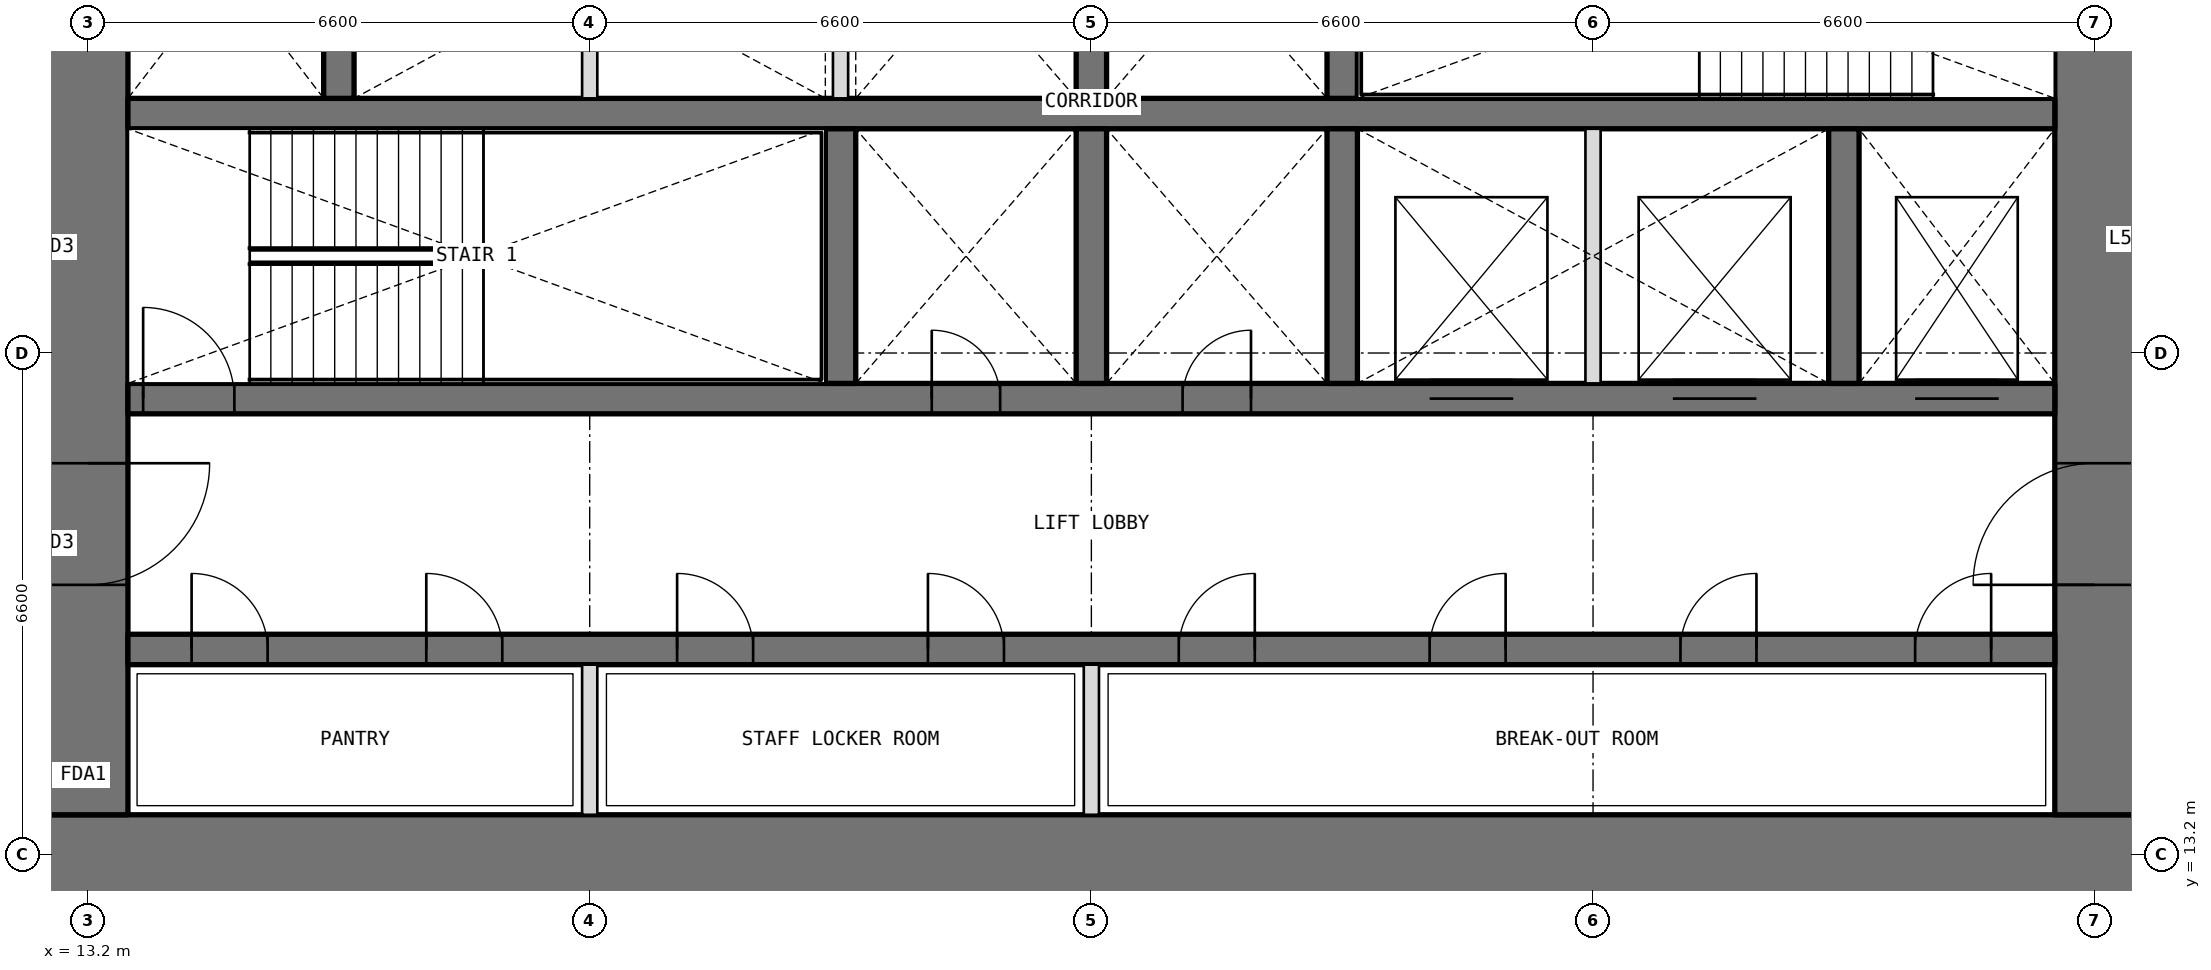
"""IFC4 building model, lengths in metres.
Left out: names, types, materials, properties, quantities, classifications, styles, units other than length and angle.
Written with IfcOpenShell. Run it as: python <this file> out.ifc"""

import sys

from ifc_helpers import new_model, si_unit, direction, frame, frame_2d, origin, place, context, subcontext, project, spatial, rectangle, extrude, element, fill, save


model = new_model("IFC4")
c1 = context("Model", 3, precision=1e-05, world=origin(), true_north=direction((0.0, 1.0)))
c2 = subcontext(c1, "Body", "Model", "MODEL_VIEW")
j1 = project(units=[si_unit("LENGTHUNIT", "METRE"), si_unit("PLANEANGLEUNIT", "RADIAN")], contexts=[c1])
p1 = place(None, origin())
s1 = spatial("IfcSite", under=j1, at=p1, CompositionType="ELEMENT")
p2 = place(p1, origin())
s2 = spatial("IfcBuilding", under=s1, at=p2, CompositionType="ELEMENT")
p3 = place(p2, frame((0.0, 0.0, 258.6)))
s3 = spatial("IfcBuildingStorey", under=s2, at=p3, CompositionType="ELEMENT", Elevation=258.6)
p4 = place(p3, frame((12.675, 13.2, 0.0), z_axis=(0.0, 0.0, 1.0), x_axis=(1.0, 0.0, 0.0)))
e1 = element("IfcWall", 1, at=p4, inside=s3, PredefinedType="SHEAR", context=c2, shape_type="SweptSolid", body=[
    extrude(rectangle(XDim=27.45, YDim=1.05, at=frame_2d((13.725, 0.0))), origin(), (0.0, 0.0, 1.0), 4.2),
])
p5 = place(p3, frame((39.6, 13.725, 0.0), z_axis=(0.0, 0.0, 1.0), x_axis=(0.0, 1.0, 0.0)))
e2 = element("IfcWall", 2, at=p5, inside=s3, PredefinedType="SHEAR", context=c2, shape_type="SweptSolid", body=[
    extrude(rectangle(XDim=18.75, YDim=1.05, at=frame_2d((9.375, 0.0))), origin(), (0.0, 0.0, 1.0), 4.2),
])
p6 = place(p5, frame((3.025, 0.0, 0.0)))
e3 = element("IfcOpeningElement", 3, at=p6, cuts=e2, PredefinedType="OPENING", context=c2, shape_type="SweptSolid", body=[
    extrude(rectangle(XDim=1.6, YDim=2.1, at=frame_2d((0.8, 1.05))), frame((0.0, 0.535, 0.0), z_axis=(0.0, -1.0, 0.0), x_axis=(1.0, 0.0, 0.0)), (0.0, 0.0, 1.0), 1.07),
])
p7 = place(p5, frame((13.825, 0.0, 0.0)))
e4 = element("IfcOpeningElement", 4, at=p7, cuts=e2, PredefinedType="OPENING", context=c2, shape_type="SweptSolid", body=[
    extrude(rectangle(XDim=1.6, YDim=2.1, at=frame_2d((0.8, 1.05))), frame((0.0, 0.535, 0.0), z_axis=(0.0, -1.0, 0.0), x_axis=(1.0, 0.0, 0.0)), (0.0, 0.0, 1.0), 1.07),
])
p8 = place(p3, frame((13.2, 32.475, 0.0), z_axis=(0.0, 0.0, 1.0), x_axis=(0.0, -1.0, 0.0)))
e5 = element("IfcWall", 5, at=p8, inside=s3, PredefinedType="SHEAR", context=c2, shape_type="SweptSolid", body=[
    extrude(rectangle(XDim=18.75, YDim=1.05, at=frame_2d((9.375, 0.0))), origin(), (0.0, 0.0, 1.0), 4.2),
])
p9 = place(p8, frame((14.125, 0.0, 0.0)))
e6 = element("IfcOpeningElement", 6, at=p9, cuts=e5, PredefinedType="OPENING", context=c2, shape_type="SweptSolid", body=[
    extrude(rectangle(XDim=1.6, YDim=2.1, at=frame_2d((0.8, 1.05))), frame((0.0, 0.535, 0.0), z_axis=(0.0, -1.0, 0.0), x_axis=(1.0, 0.0, 0.0)), (0.0, 0.0, 1.0), 1.07),
])
p10 = place(p8, frame((3.325, 0.0, 0.0)))
e7 = element("IfcOpeningElement", 7, at=p10, cuts=e5, PredefinedType="OPENING", context=c2, shape_type="SweptSolid", body=[
    extrude(rectangle(XDim=1.6, YDim=2.1, at=frame_2d((0.8, 1.05))), frame((0.0, 0.535, 0.0), z_axis=(0.0, -1.0, 0.0), x_axis=(1.0, 0.0, 0.0)), (0.0, 0.0, 1.0), 1.07),
])
p11 = place(p3, frame((13.725, 15.9, 0.0), z_axis=(0.0, 0.0, 1.0), x_axis=(1.0, 0.0, 0.0)))
e8 = element("IfcWall", 8, at=p11, inside=s3, PredefinedType="SHEAR", context=c2, shape_type="SweptSolid", body=[
    extrude(rectangle(XDim=25.35, YDim=0.4, at=frame_2d((12.675, 0.0))), origin(), (0.0, 0.0, 1.0), 4.2),
])
p12 = place(p11, frame((0.837, 0.0, 0.0)))
e9 = element("IfcOpeningElement", 9, at=p12, cuts=e8, PredefinedType="OPENING", context=c2, shape_type="SweptSolid", body=[
    extrude(rectangle(XDim=1.0, YDim=2.1, at=frame_2d((0.5, 1.05))), frame((0.0, 0.21, 0.0), z_axis=(0.0, -1.0, 0.0), x_axis=(1.0, 0.0, 0.0)), (0.0, 0.0, 1.0), 0.42),
])
p13 = place(p11, frame((3.925, 0.0, 0.0)))
e10 = element("IfcOpeningElement", 10, at=p13, cuts=e8, PredefinedType="OPENING", context=c2, shape_type="SweptSolid", body=[
    extrude(rectangle(XDim=1.0, YDim=2.1, at=frame_2d((0.5, 1.05))), frame((0.0, 0.21, 0.0), z_axis=(0.0, -1.0, 0.0), x_axis=(1.0, 0.0, 0.0)), (0.0, 0.0, 1.0), 0.42),
])
p14 = place(p11, frame((7.225, 0.0, 0.0)))
e11 = element("IfcOpeningElement", 11, at=p14, cuts=e8, PredefinedType="OPENING", context=c2, shape_type="SweptSolid", body=[
    extrude(rectangle(XDim=1.0, YDim=2.1, at=frame_2d((0.5, 1.05))), frame((0.0, 0.21, 0.0), z_axis=(0.0, -1.0, 0.0), x_axis=(1.0, 0.0, 0.0)), (0.0, 0.0, 1.0), 0.42),
])
p15 = place(p11, frame((10.525, 0.0, 0.0)))
e12 = element("IfcOpeningElement", 12, at=p15, cuts=e8, PredefinedType="OPENING", context=c2, shape_type="SweptSolid", body=[
    extrude(rectangle(XDim=1.0, YDim=2.1, at=frame_2d((0.5, 1.05))), frame((0.0, 0.21, 0.0), z_axis=(0.0, -1.0, 0.0), x_axis=(1.0, 0.0, 0.0)), (0.0, 0.0, 1.0), 0.42),
])
p16 = place(p11, frame((13.825, 0.0, 0.0)))
e13 = element("IfcOpeningElement", 13, at=p16, cuts=e8, PredefinedType="OPENING", context=c2, shape_type="SweptSolid", body=[
    extrude(rectangle(XDim=1.0, YDim=2.1, at=frame_2d((0.5, 1.05))), frame((0.0, 0.21, 0.0), z_axis=(0.0, -1.0, 0.0), x_axis=(1.0, 0.0, 0.0)), (0.0, 0.0, 1.0), 0.42),
])
p17 = place(p11, frame((17.125, 0.0, 0.0)))
e14 = element("IfcOpeningElement", 14, at=p17, cuts=e8, PredefinedType="OPENING", context=c2, shape_type="SweptSolid", body=[
    extrude(rectangle(XDim=1.0, YDim=2.1, at=frame_2d((0.5, 1.05))), frame((0.0, 0.21, 0.0), z_axis=(0.0, -1.0, 0.0), x_axis=(1.0, 0.0, 0.0)), (0.0, 0.0, 1.0), 0.42),
])
p18 = place(p11, frame((20.425, 0.0, 0.0)))
e15 = element("IfcOpeningElement", 15, at=p18, cuts=e8, PredefinedType="OPENING", context=c2, shape_type="SweptSolid", body=[
    extrude(rectangle(XDim=1.0, YDim=2.1, at=frame_2d((0.5, 1.05))), frame((0.0, 0.21, 0.0), z_axis=(0.0, -1.0, 0.0), x_axis=(1.0, 0.0, 0.0)), (0.0, 0.0, 1.0), 0.42),
])
p19 = place(p11, frame((23.512, 0.0, 0.0)))
e16 = element("IfcOpeningElement", 16, at=p19, cuts=e8, PredefinedType="OPENING", context=c2, shape_type="SweptSolid", body=[
    extrude(rectangle(XDim=1.0, YDim=2.1, at=frame_2d((0.5, 1.05))), frame((0.0, 0.21, 0.0), z_axis=(0.0, -1.0, 0.0), x_axis=(1.0, 0.0, 0.0)), (0.0, 0.0, 1.0), 0.42),
])
p20 = place(p3, frame((13.725, 19.2, 0.0), z_axis=(0.0, 0.0, 1.0), x_axis=(1.0, 0.0, 0.0)))
e17 = element("IfcWall", 17, at=p20, inside=s3, PredefinedType="SHEAR", context=c2, shape_type="SweptSolid", body=[
    extrude(rectangle(XDim=25.35, YDim=0.4, at=frame_2d((12.675, 0.0))), origin(), (0.0, 0.0, 1.0), 4.2),
])
p21 = place(p20, frame((10.575, 0.0, 0.0)))
e18 = element("IfcOpeningElement", 18, at=p21, cuts=e17, PredefinedType="OPENING", context=c2, shape_type="SweptSolid", body=[
    extrude(rectangle(XDim=0.9, YDim=2.1, at=frame_2d((0.45, 1.05))), frame((0.0, 0.21, 0.0), z_axis=(0.0, -1.0, 0.0), x_axis=(1.0, 0.0, 0.0)), (0.0, 0.0, 1.0), 0.42),
])
p22 = place(p20, frame((13.875, 0.0, 0.0)))
e19 = element("IfcOpeningElement", 19, at=p22, cuts=e17, PredefinedType="OPENING", context=c2, shape_type="SweptSolid", body=[
    extrude(rectangle(XDim=0.9, YDim=2.1, at=frame_2d((0.45, 1.05))), frame((0.0, 0.21, 0.0), z_axis=(0.0, -1.0, 0.0), x_axis=(1.0, 0.0, 0.0)), (0.0, 0.0, 1.0), 0.42),
])
p23 = place(p20, frame((0.2, 0.0, 0.0)))
e20 = element("IfcOpeningElement", 20, at=p23, cuts=e17, PredefinedType="OPENING", context=c2, shape_type="SweptSolid", body=[
    extrude(rectangle(XDim=1.2, YDim=2.1, at=frame_2d((0.6, 1.05))), frame((0.0, 0.21, 0.0), z_axis=(0.0, -1.0, 0.0), x_axis=(1.0, 0.0, 0.0)), (0.0, 0.0, 1.0), 0.42),
])
p24 = place(p20, frame((23.512, 0.0, 0.0)))
e21 = element("IfcOpeningElement", 21, at=p24, cuts=e17, PredefinedType="OPENING", context=c2, shape_type="SweptSolid", body=[
    extrude(rectangle(XDim=1.1, YDim=2.1, at=frame_2d((0.55, 1.05))), frame((0.0, 0.21, 0.0), z_axis=(0.0, -1.0, 0.0), x_axis=(1.0, 0.0, 0.0)), (0.0, 0.0, 1.0), 0.42),
])
p25 = place(p20, frame((17.125, 0.0, 0.0)))
e22 = element("IfcOpeningElement", 22, at=p25, cuts=e17, PredefinedType="OPENING", context=c2, shape_type="SweptSolid", body=[
    extrude(rectangle(XDim=1.1, YDim=2.1, at=frame_2d((0.55, 1.05))), frame((0.0, 0.21, 0.0), z_axis=(0.0, -1.0, 0.0), x_axis=(1.0, 0.0, 0.0)), (0.0, 0.0, 1.0), 0.42),
])
p26 = place(p20, frame((20.325, 0.0, 0.0)))
e23 = element("IfcOpeningElement", 23, at=p26, cuts=e17, PredefinedType="OPENING", context=c2, shape_type="SweptSolid", body=[
    extrude(rectangle(XDim=1.1, YDim=2.1, at=frame_2d((0.55, 1.05))), frame((0.0, 0.21, 0.0), z_axis=(0.0, -1.0, 0.0), x_axis=(1.0, 0.0, 0.0)), (0.0, 0.0, 1.0), 0.42),
])
p27 = place(p3, frame((13.725, 22.95, 0.0), z_axis=(0.0, 0.0, 1.0), x_axis=(1.0, 0.0, 0.0)))
e24 = element("IfcWall", 24, at=p27, inside=s3, PredefinedType="SHEAR", context=c2, shape_type="SweptSolid", body=[
    extrude(rectangle(XDim=25.35, YDim=0.4, at=frame_2d((12.675, 0.0))), origin(), (0.0, 0.0, 1.0), 4.2),
])
for number, where, z_axis, x_axis in (
    (25, (23.1, 19.4, 0.0), (0.0, 0.0, 1.0), (0.0, 1.0, 0.0)),
    (26, (26.4, 19.4, 0.0), (0.0, 0.0, 1.0), (0.0, 1.0, 0.0)),
    (27, (29.7, 19.4, 0.0), (0.0, 0.0, 1.0), (0.0, 1.0, 0.0)),
    (28, (36.3, 19.4, 0.0), (0.0, 0.0, 1.0), (0.0, 1.0, 0.0)),
    (29, (16.5, 23.15, 0.0), (0.0, 0.0, 1.0), (0.0, 1.0, 0.0)),
    (30, (26.4, 23.15, 0.0), (0.0, 0.0, 1.0), (0.0, 1.0, 0.0)),
    (31, (29.7, 23.15, 0.0), (0.0, 0.0, 1.0), (0.0, 1.0, 0.0)),
):
    element("IfcWall", number, at=place(p3, frame(where, z_axis=z_axis, x_axis=x_axis)), inside=s3, PredefinedType="SHEAR", context=c2, shape_type="SweptSolid", body=[
        extrude(rectangle(XDim=3.35, YDim=0.4, at=frame_2d((1.675, 0.0))), origin(), (0.0, 0.0, 1.0), 4.2),
    ])
for number, where, z_axis, x_axis in (
    (32, (19.8, 13.725, 0.0), (0.0, 0.0, 1.0), (0.0, 1.0, 0.0)),
    (33, (26.4, 13.725, 0.0), (0.0, 0.0, 1.0), (0.0, 1.0, 0.0)),
):
    element("IfcWall", number, at=place(p3, frame(where, z_axis=z_axis, x_axis=x_axis)), inside=s3, PredefinedType="PARTITIONING", context=c2, shape_type="SweptSolid", body=[
        extrude(rectangle(XDim=1.975, YDim=0.2, at=frame_2d((0.987, 0.0))), origin(), (0.0, 0.0, 1.0), 4.2),
    ])
for number, where, z_axis, x_axis in (
    (34, (33.0, 19.4, 0.0), (0.0, 0.0, 1.0), (0.0, 1.0, 0.0)),
    (35, (19.8, 23.15, 0.0), (0.0, 0.0, 1.0), (0.0, 1.0, 0.0)),
    (36, (23.1, 23.15, 0.0), (0.0, 0.0, 1.0), (0.0, 1.0, 0.0)),
):
    element("IfcWall", number, at=place(p3, frame(where, z_axis=z_axis, x_axis=x_axis)), inside=s3, PredefinedType="PARTITIONING", context=c2, shape_type="SweptSolid", body=[
        extrude(rectangle(XDim=3.35, YDim=0.2, at=frame_2d((1.675, 0.0))), origin(), (0.0, 0.0, 1.0), 4.2),
    ])
p28 = place(p21, origin())
e37 = element("IfcDoor", 37, at=p28, inside=s3, OperationType="SINGLE_SWING_LEFT", PredefinedType="DOOR", context=c2, shape_type="SweptSolid", body=[
    extrude(rectangle(XDim=0.9, YDim=2.1, at=frame_2d((0.45, 1.05))), frame((0.0, 0.025, 0.0), z_axis=(0.0, -1.0, 0.0), x_axis=(1.0, 0.0, 0.0)), (0.0, 0.0, 1.0), 0.05),
])
fill(e18, e37)
p29 = place(p22, origin())
e38 = element("IfcDoor", 38, at=p29, inside=s3, OperationType="SINGLE_SWING_RIGHT", PredefinedType="DOOR", context=c2, shape_type="SweptSolid", body=[
    extrude(rectangle(XDim=0.9, YDim=2.1, at=frame_2d((0.45, 1.05))), frame((0.0, 0.025, 0.0), z_axis=(0.0, -1.0, 0.0), x_axis=(1.0, 0.0, 0.0)), (0.0, 0.0, 1.0), 0.05),
])
fill(e19, e38)
p30 = place(p12, origin())
e39 = element("IfcDoor", 39, at=p30, inside=s3, OperationType="SINGLE_SWING_LEFT", PredefinedType="DOOR", context=c2, shape_type="SweptSolid", body=[
    extrude(rectangle(XDim=1.0, YDim=2.1, at=frame_2d((0.5, 1.05))), frame((0.0, 0.025, 0.0), z_axis=(0.0, -1.0, 0.0), x_axis=(1.0, 0.0, 0.0)), (0.0, 0.0, 1.0), 0.05),
])
fill(e9, e39)
p31 = place(p13, origin())
e40 = element("IfcDoor", 40, at=p31, inside=s3, OperationType="SINGLE_SWING_LEFT", PredefinedType="DOOR", context=c2, shape_type="SweptSolid", body=[
    extrude(rectangle(XDim=1.0, YDim=2.1, at=frame_2d((0.5, 1.05))), frame((0.0, 0.025, 0.0), z_axis=(0.0, -1.0, 0.0), x_axis=(1.0, 0.0, 0.0)), (0.0, 0.0, 1.0), 0.05),
])
fill(e10, e40)
p32 = place(p14, origin())
e41 = element("IfcDoor", 41, at=p32, inside=s3, OperationType="SINGLE_SWING_LEFT", PredefinedType="DOOR", context=c2, shape_type="SweptSolid", body=[
    extrude(rectangle(XDim=1.0, YDim=2.1, at=frame_2d((0.5, 1.05))), frame((0.0, 0.025, 0.0), z_axis=(0.0, -1.0, 0.0), x_axis=(1.0, 0.0, 0.0)), (0.0, 0.0, 1.0), 0.05),
])
fill(e11, e41)
p33 = place(p15, origin())
e42 = element("IfcDoor", 42, at=p33, inside=s3, OperationType="SINGLE_SWING_LEFT", PredefinedType="DOOR", context=c2, shape_type="SweptSolid", body=[
    extrude(rectangle(XDim=1.0, YDim=2.1, at=frame_2d((0.5, 1.05))), frame((0.0, 0.025, 0.0), z_axis=(0.0, -1.0, 0.0), x_axis=(1.0, 0.0, 0.0)), (0.0, 0.0, 1.0), 0.05),
])
fill(e12, e42)
p34 = place(p16, origin())
e43 = element("IfcDoor", 43, at=p34, inside=s3, OperationType="SINGLE_SWING_RIGHT", PredefinedType="DOOR", context=c2, shape_type="SweptSolid", body=[
    extrude(rectangle(XDim=1.0, YDim=2.1, at=frame_2d((0.5, 1.05))), frame((0.0, 0.025, 0.0), z_axis=(0.0, -1.0, 0.0), x_axis=(1.0, 0.0, 0.0)), (0.0, 0.0, 1.0), 0.05),
])
fill(e13, e43)
p35 = place(p17, origin())
e44 = element("IfcDoor", 44, at=p35, inside=s3, OperationType="SINGLE_SWING_RIGHT", PredefinedType="DOOR", context=c2, shape_type="SweptSolid", body=[
    extrude(rectangle(XDim=1.0, YDim=2.1, at=frame_2d((0.5, 1.05))), frame((0.0, 0.025, 0.0), z_axis=(0.0, -1.0, 0.0), x_axis=(1.0, 0.0, 0.0)), (0.0, 0.0, 1.0), 0.05),
])
fill(e14, e44)
p36 = place(p18, origin())
e45 = element("IfcDoor", 45, at=p36, inside=s3, OperationType="SINGLE_SWING_RIGHT", PredefinedType="DOOR", context=c2, shape_type="SweptSolid", body=[
    extrude(rectangle(XDim=1.0, YDim=2.1, at=frame_2d((0.5, 1.05))), frame((0.0, 0.025, 0.0), z_axis=(0.0, -1.0, 0.0), x_axis=(1.0, 0.0, 0.0)), (0.0, 0.0, 1.0), 0.05),
])
fill(e15, e45)
p37 = place(p19, origin())
e46 = element("IfcDoor", 46, at=p37, inside=s3, OperationType="SINGLE_SWING_RIGHT", PredefinedType="DOOR", context=c2, shape_type="SweptSolid", body=[
    extrude(rectangle(XDim=1.0, YDim=2.1, at=frame_2d((0.5, 1.05))), frame((0.0, 0.025, 0.0), z_axis=(0.0, -1.0, 0.0), x_axis=(1.0, 0.0, 0.0)), (0.0, 0.0, 1.0), 0.05),
])
fill(e16, e46)
p38 = place(p23, origin())
e47 = element("IfcDoor", 47, at=p38, inside=s3, OperationType="SINGLE_SWING_LEFT", PredefinedType="DOOR", context=c2, shape_type="SweptSolid", body=[
    extrude(rectangle(XDim=1.2, YDim=2.1, at=frame_2d((0.6, 1.05))), frame((0.0, 0.025, 0.0), z_axis=(0.0, -1.0, 0.0), x_axis=(1.0, 0.0, 0.0)), (0.0, 0.0, 1.0), 0.05),
])
fill(e20, e47)
p39 = place(p9, origin())
e48 = element("IfcDoor", 48, at=p39, inside=s3, OperationType="DOUBLE_DOOR_DOUBLE_SWING", PredefinedType="DOOR", context=c2, shape_type="SweptSolid", body=[
    extrude(rectangle(XDim=1.6, YDim=2.1, at=frame_2d((0.8, 1.05))), frame((0.0, 0.025, 0.0), z_axis=(0.0, -1.0, 0.0), x_axis=(1.0, 0.0, 0.0)), (0.0, 0.0, 1.0), 0.05),
])
fill(e6, e48)
p40 = place(p6, origin())
e49 = element("IfcDoor", 49, at=p40, inside=s3, OperationType="DOUBLE_DOOR_DOUBLE_SWING", PredefinedType="DOOR", context=c2, shape_type="SweptSolid", body=[
    extrude(rectangle(XDim=1.6, YDim=2.1, at=frame_2d((0.8, 1.05))), frame((0.0, 0.025, 0.0), z_axis=(0.0, -1.0, 0.0), x_axis=(1.0, 0.0, 0.0)), (0.0, 0.0, 1.0), 0.05),
])
fill(e3, e49)
p41 = place(p24, origin())
e50 = element("IfcDoor", 50, at=p41, inside=s3, OperationType="DOUBLE_DOOR_SLIDING", PredefinedType="DOOR", context=c2, shape_type="SweptSolid", body=[
    extrude(rectangle(XDim=1.1, YDim=2.1, at=frame_2d((0.55, 1.05))), frame((0.0, 0.025, 0.0), z_axis=(0.0, -1.0, 0.0), x_axis=(1.0, 0.0, 0.0)), (0.0, 0.0, 1.0), 0.05),
])
fill(e21, e50)
p42 = place(p25, origin())
e51 = element("IfcDoor", 51, at=p42, inside=s3, OperationType="DOUBLE_DOOR_SLIDING", PredefinedType="DOOR", context=c2, shape_type="SweptSolid", body=[
    extrude(rectangle(XDim=1.1, YDim=2.1, at=frame_2d((0.55, 1.05))), frame((0.0, 0.025, 0.0), z_axis=(0.0, -1.0, 0.0), x_axis=(1.0, 0.0, 0.0)), (0.0, 0.0, 1.0), 0.05),
])
fill(e22, e51)
p43 = place(p26, origin())
e52 = element("IfcDoor", 52, at=p43, inside=s3, OperationType="DOUBLE_DOOR_SLIDING", PredefinedType="DOOR", context=c2, shape_type="SweptSolid", body=[
    extrude(rectangle(XDim=1.1, YDim=2.1, at=frame_2d((0.55, 1.05))), frame((0.0, 0.025, 0.0), z_axis=(0.0, -1.0, 0.0), x_axis=(1.0, 0.0, 0.0)), (0.0, 0.0, 1.0), 0.05),
])
fill(e23, e52)
save(model, sys.argv[1])
